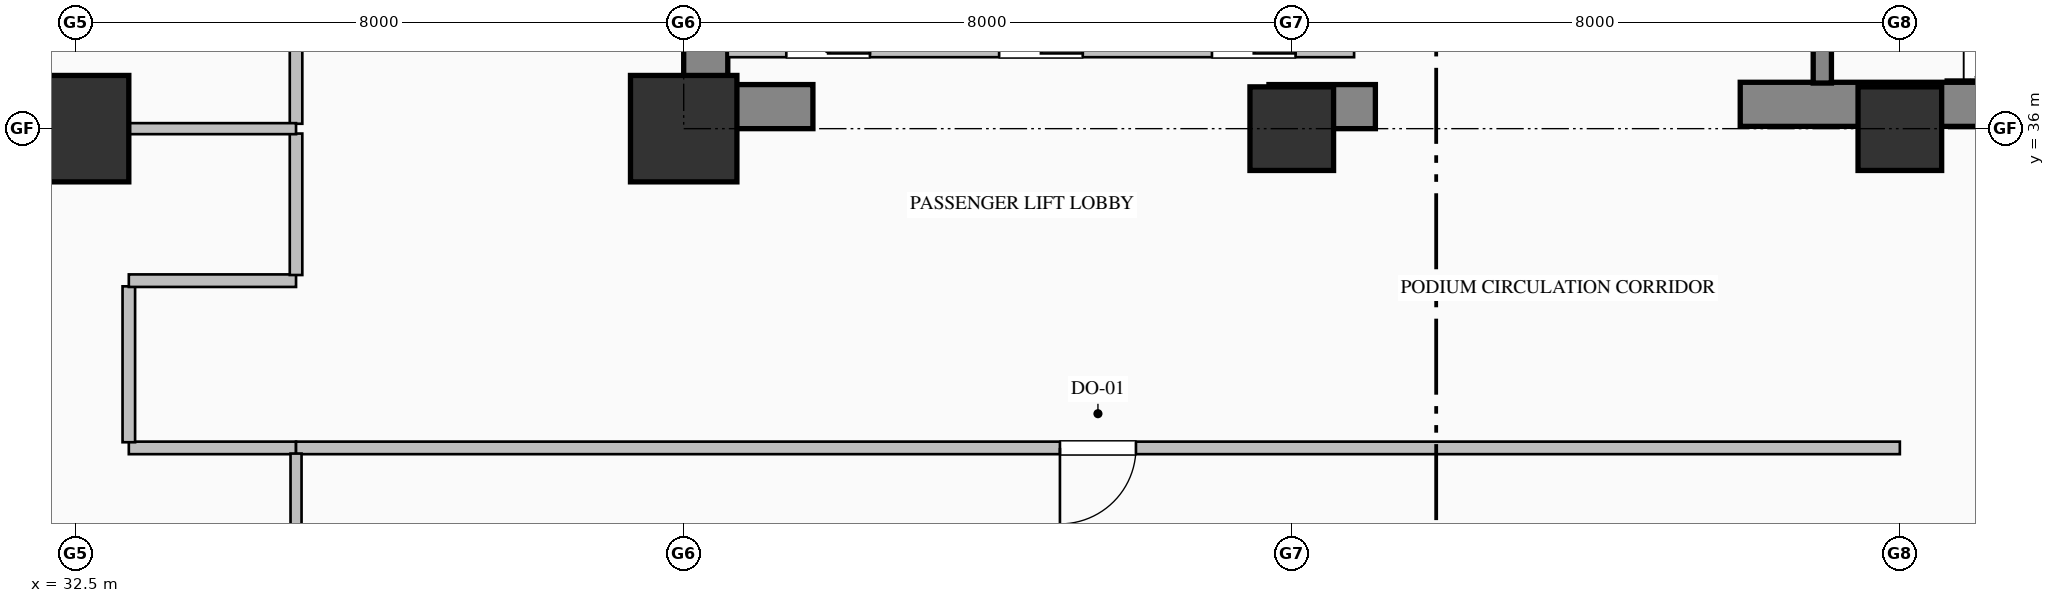
"""IFC4 building model, lengths in metres.
Left out: names, types, materials, properties, quantities, classifications, styles, units other than length and angle.
Written with IfcOpenShell. Run it as: python <this file> out.ifc"""

import sys

from ifc_helpers import new_model, si_unit, direction, frame, frame_2d, origin, origin_2d, place, context, subcontext, project, spatial, rectangle, hollow_rectangle, extrude, element, fill, save


model = new_model("IFC4")
c1 = context("Model", 3, precision=1e-05, world=origin(), true_north=direction((0.0, 1.0)))
c2 = subcontext(c1, "Body", "Model", "MODEL_VIEW")
j1 = project(units=[si_unit("LENGTHUNIT", "METRE"), si_unit("PLANEANGLEUNIT", "RADIAN")], contexts=[c1])
p1 = place(None, origin())
s1 = spatial("IfcSite", under=j1, at=p1, CompositionType="ELEMENT")
p2 = place(p1, origin())
s2 = spatial("IfcBuilding", under=s1, at=p2, CompositionType="ELEMENT")
p3 = place(p2, frame((0.0, 0.0, 6.0)))
s3 = spatial("IfcBuildingStorey", under=s2, at=p3, CompositionType="ELEMENT", Elevation=6.0)
p4 = place(p3, frame((40.79, 36.58, 0.0), z_axis=(0.0, 0.0, 1.0), x_axis=(0.0, 1.0, 0.0)))
e1 = element("IfcWall", 1, at=p4, inside=s3, PredefinedType="SHEAR", context=c2, shape_type="SweptSolid", body=[
    extrude(rectangle(XDim=7.82, YDim=0.58, at=frame_2d((3.91, 0.0))), origin(), (0.0, 0.0, 1.0), 5.12),
])
p5 = place(p3, frame((40.5, 36.29, 0.0), z_axis=(0.0, 0.0, 1.0), x_axis=(1.0, 0.0, 0.0)))
e2 = element("IfcWall", 2, at=p5, inside=s3, PredefinedType="SHEAR", context=c2, shape_type="SweptSolid", body=[
    extrude(rectangle(XDim=1.7, YDim=0.58, at=frame_2d((0.85, 0.0))), origin(), (0.0, 0.0, 1.0), 5.12),
])
p6 = place(p3, frame((48.2, 36.29, 0.0), z_axis=(0.0, 0.0, 1.0), x_axis=(1.0, 0.0, 0.0)))
e3 = element("IfcWall", 3, at=p6, inside=s3, PredefinedType="SHEAR", context=c2, shape_type="SweptSolid", body=[
    extrude(rectangle(XDim=1.4, YDim=0.58, at=frame_2d((0.7, 0.0))), origin(), (0.0, 0.0, 1.0), 5.12),
])
p7 = place(p3, frame((54.4, 36.32, 0.0), z_axis=(0.0, 0.0, 1.0), x_axis=(1.0, 0.0, 0.0)))
e4 = element("IfcWall", 4, at=p7, inside=s3, PredefinedType="SHEAR", context=c2, shape_type="SweptSolid", body=[
    extrude(rectangle(XDim=9.6, YDim=0.58, at=frame_2d((4.8, 0.0))), origin(), (0.0, 0.0, 1.0), 5.4),
])
for number, where, z_axis, x_axis in (
    (5, (32.5, 36.0, 0.0), (0.0, 0.0, 1.0), (1.0, 0.0, 0.0)),
    (6, (40.5, 36.0, 0.0), (0.0, 0.0, 1.0), (1.0, 0.0, 0.0)),
):
    element("IfcColumn", number, at=place(p3, frame(where, z_axis=z_axis, x_axis=x_axis)), inside=s3, PredefinedType="COLUMN", context=c2, shape_type="SweptSolid", body=[
        extrude(hollow_rectangle(XDim=1.4, YDim=1.4, WallThickness=0.05, at=origin_2d()), origin(), (0.0, 0.0, 1.0), 5.4),
    ])
for number, where, z_axis, x_axis in (
    (7, (48.5, 36.0, 0.0), (0.0, 0.0, 1.0), (1.0, 0.0, 0.0)),
    (8, (56.5, 36.0, 0.0), (0.0, 0.0, 1.0), (1.0, 0.0, 0.0)),
):
    element("IfcColumn", number, at=place(p3, frame(where, z_axis=z_axis, x_axis=x_axis)), inside=s3, PredefinedType="COLUMN", context=c2, shape_type="SweptSolid", body=[
        extrude(rectangle(XDim=1.1, YDim=1.1, at=origin_2d()), origin(), (0.0, 0.0, 1.0), 5.4),
    ])
p8 = place(p3, frame((55.48, 39.75, 0.0), z_axis=(0.0, 0.0, 1.0), x_axis=(0.0, -1.0, 0.0)))
e9 = element("IfcWall", 9, at=p8, inside=s3, PredefinedType="SOLIDWALL", context=c2, shape_type="SweptSolid", body=[
    extrude(rectangle(XDim=3.15, YDim=0.24, at=frame_2d((1.575, 0.0))), origin(), (0.0, 0.0, 1.0), 5.4),
])
p9 = place(p8, frame((1.0, 0.0, 0.0)))
e10 = element("IfcOpeningElement", 10, at=p9, cuts=e9, PredefinedType="OPENING", context=c2, shape_type="SweptSolid", body=[
    extrude(rectangle(XDim=1.15, YDim=2.2, at=frame_2d((0.575, 1.1))), frame((0.0, 0.13, 0.0), z_axis=(0.0, -1.0, 0.0), x_axis=(1.0, 0.0, 0.0)), (0.0, 0.0, 1.0), 0.26),
])
p10 = place(p3, frame((49.32, 37.05, 0.0), z_axis=(0.0, 0.0, 1.0), x_axis=(-1.0, 0.0, 0.0)))
e11 = element("IfcWall", 11, at=p10, inside=s3, PredefinedType="PARTITIONING", context=c2, shape_type="SweptSolid", body=[
    extrude(rectangle(XDim=8.24, YDim=0.22, at=frame_2d((4.12, 0.0))), origin(), (0.0, 0.0, 1.0), 5.12),
])
p11 = place(p10, frame((6.37, 0.0, 0.0)))
e12 = element("IfcOpeningElement", 12, at=p11, cuts=e11, PredefinedType="OPENING", context=c2, shape_type="SweptSolid", body=[
    extrude(rectangle(XDim=1.1, YDim=2.2, at=frame_2d((0.55, 1.1))), frame((0.0, 0.12, 0.0), z_axis=(0.0, -1.0, 0.0), x_axis=(1.0, 0.0, 0.0)), (0.0, 0.0, 1.0), 0.24),
])
p12 = place(p10, frame((3.57, 0.0, 0.0)))
e13 = element("IfcOpeningElement", 13, at=p12, cuts=e11, PredefinedType="OPENING", context=c2, shape_type="SweptSolid", body=[
    extrude(rectangle(XDim=1.1, YDim=2.2, at=frame_2d((0.55, 1.1))), frame((0.0, 0.12, 0.0), z_axis=(0.0, -1.0, 0.0), x_axis=(1.0, 0.0, 0.0)), (0.0, 0.0, 1.0), 0.24),
])
p13 = place(p10, frame((0.77, 0.0, 0.0)))
e14 = element("IfcOpeningElement", 14, at=p13, cuts=e11, PredefinedType="OPENING", context=c2, shape_type="SweptSolid", body=[
    extrude(rectangle(XDim=1.1, YDim=2.2, at=frame_2d((0.55, 1.1))), frame((0.0, 0.12, 0.0), z_axis=(0.0, -1.0, 0.0), x_axis=(1.0, 0.0, 0.0)), (0.0, 0.0, 1.0), 0.24),
])
p14 = place(p3, frame((35.4, 31.8, 0.0), z_axis=(0.0, 0.0, 1.0), x_axis=(-1.0, 0.0, 0.0)))
e15 = element("IfcWall", 15, at=p14, inside=s3, PredefinedType="PARTITIONING", context=c2, shape_type="SweptSolid", body=[
    extrude(rectangle(XDim=2.2, YDim=0.165, at=frame_2d((1.1, 0.0))), origin(), (0.0, 0.0, 1.0), 5.12),
])
p15 = place(p3, frame((33.2, 31.875, 0.0), z_axis=(0.0, 0.0, 1.0), x_axis=(0.0, 1.0, 0.0)))
e16 = element("IfcWall", 16, at=p15, inside=s3, PredefinedType="PARTITIONING", context=c2, shape_type="SweptSolid", body=[
    extrude(rectangle(XDim=2.051, YDim=0.165, at=frame_2d((1.025, 0.0))), origin(), (0.0, 0.0, 1.0), 5.12),
])
p16 = place(p3, frame((33.2, 34.0, 0.0), z_axis=(0.0, 0.0, 1.0), x_axis=(1.0, 0.0, 0.0)))
e17 = element("IfcWall", 17, at=p16, inside=s3, PredefinedType="PARTITIONING", context=c2, shape_type="SweptSolid", body=[
    extrude(rectangle(XDim=2.2, YDim=0.165, at=frame_2d((1.1, 0.0))), origin(), (0.0, 0.0, 1.0), 5.12),
])
p17 = place(p3, frame((56.5, 31.8, 0.0), z_axis=(0.0, 0.0, 1.0), x_axis=(-1.0, 0.0, 0.0)))
e18 = element("IfcWall", 18, at=p17, inside=s3, PredefinedType="PARTITIONING", context=c2, shape_type="SweptSolid", body=[
    extrude(rectangle(XDim=21.1, YDim=0.165, at=frame_2d((10.55, 0.0))), origin(), (0.0, 0.0, 1.0), 5.12),
])
p18 = place(p17, frame((10.05, 0.0, 0.0)))
e19 = element("IfcOpeningElement", 19, at=p18, cuts=e18, PredefinedType="OPENING", context=c2, shape_type="SweptSolid", body=[
    extrude(rectangle(XDim=1.0, YDim=2.15, at=frame_2d((0.5, 1.075))), frame((0.0, 0.093, 0.0), z_axis=(0.0, -1.0, 0.0), x_axis=(1.0, 0.0, 0.0)), (0.0, 0.0, 1.0), 0.185),
])
p19 = place(p3, frame((35.4, 34.074, 0.0), z_axis=(0.0, 0.0, 1.0), x_axis=(0.0, 1.0, 0.0)))
e20 = element("IfcWall", 20, at=p19, inside=s3, PredefinedType="PARTITIONING", context=c2, shape_type="SweptSolid", body=[
    extrude(rectangle(XDim=1.861, YDim=0.165, at=frame_2d((0.931, 0.0))), origin(), (0.0, 0.0, 1.0), 5.12),
])
p20 = place(p3, frame((35.4, 36.064, 0.0), z_axis=(0.0, 0.0, 1.0), x_axis=(0.0, 1.0, 0.0)))
e21 = element("IfcWall", 21, at=p20, inside=s3, PredefinedType="PARTITIONING", context=c2, shape_type="SweptSolid", body=[
    extrude(rectangle(XDim=11.279, YDim=0.165, at=frame_2d((5.639, 0.0))), origin(), (0.0, 0.0, 1.0), 5.12),
])
p21 = place(p20, frame((5.089, 0.0, 0.0)))
e22 = element("IfcOpeningElement", 22, at=p21, cuts=e21, PredefinedType="OPENING", context=c2, shape_type="SweptSolid", body=[
    extrude(rectangle(XDim=1.1, YDim=2.2, at=frame_2d((0.55, 1.1))), frame((0.0, 0.093, 0.0), z_axis=(0.0, -1.0, 0.0), x_axis=(1.0, 0.0, 0.0)), (0.0, 0.0, 1.0), 0.185),
])
p22 = place(p3, frame((9.0, 36.0, 0.0), z_axis=(0.0, 0.0, 1.0), x_axis=(1.0, 0.0, 0.0)))
e23 = element("IfcWall", 23, at=p22, inside=s3, PredefinedType="PARTITIONING", context=c2, shape_type="SweptSolid", body=[
    extrude(rectangle(XDim=26.4, YDim=0.145, at=frame_2d((13.2, 0.0))), origin(), (0.0, 0.0, 1.0), 4.212),
])
p23 = place(p3, frame((35.4, 31.726, 0.0), z_axis=(0.0, 0.0, 1.0), x_axis=(0.0, -1.0, 0.0)))
e24 = element("IfcWall", 24, at=p23, inside=s3, PredefinedType="PARTITIONING", context=c2, shape_type="SweptSolid", body=[
    extrude(rectangle(XDim=13.151, YDim=0.145, at=frame_2d((6.576, 0.0))), origin(), (0.0, 0.0, 1.0), 5.12),
])
p24 = place(p18, origin())
e25 = element("IfcDoor", 25, at=p24, inside=s3, OperationType="SINGLE_SWING_RIGHT", PredefinedType="DOOR", context=c2, shape_type="SweptSolid", body=[
    extrude(rectangle(XDim=1.0, YDim=2.15, at=frame_2d((0.5, 1.075))), frame((0.0, 0.025, 0.0), z_axis=(0.0, -1.0, 0.0), x_axis=(1.0, 0.0, 0.0)), (0.0, 0.0, 1.0), 0.05),
])
fill(e19, e25)
save(model, sys.argv[1])
